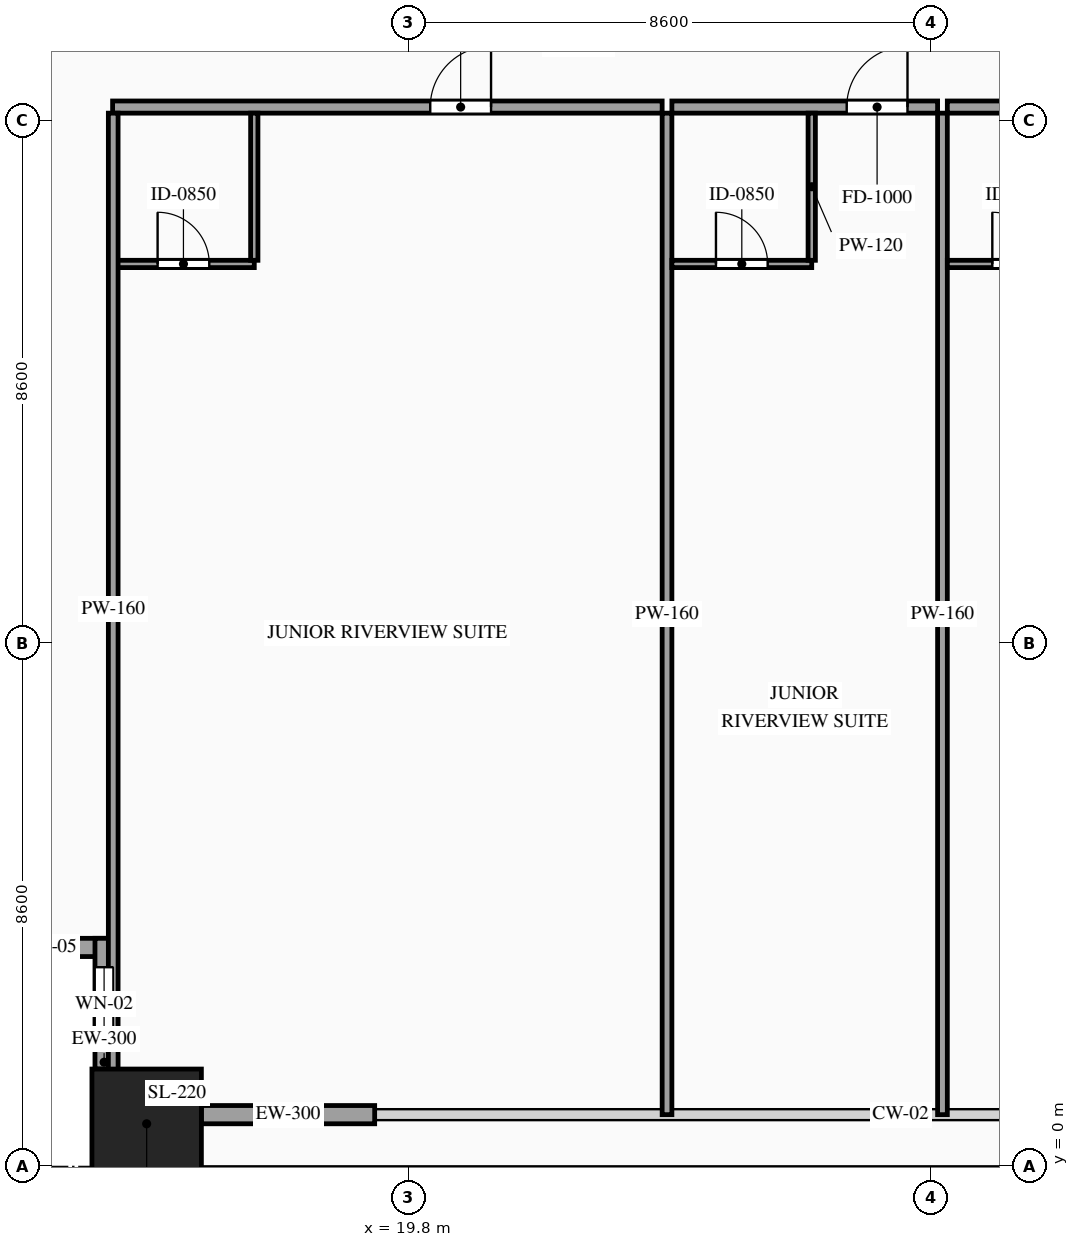
"""IFC4 building model, lengths in metres.
Left out: names, types, materials, properties, quantities, classifications, styles, units other than length and angle.
Written with IfcOpenShell. Run it as: python <this file> out.ifc"""

import sys

from ifc_helpers import new_model, si_unit, direction, frame, frame_2d, origin, origin_2d, place, context, subcontext, project, spatial, rectangle, hollow_rectangle, extrude, source, transform, mapped, element, fill, save


model = new_model("IFC4")
c1 = context("Model", 3, precision=1e-05, world=origin(), true_north=direction((0.0, 1.0)))
c2 = subcontext(c1, "Body", "Model", "MODEL_VIEW")
j1 = project(units=[si_unit("LENGTHUNIT", "METRE"), si_unit("PLANEANGLEUNIT", "RADIAN")], contexts=[c1])
p1 = place(None, origin())
s1 = spatial("IfcSite", under=j1, at=p1, CompositionType="ELEMENT")
p2 = place(p1, origin())
s2 = spatial("IfcBuilding", under=s1, at=p2, CompositionType="ELEMENT")
p3 = place(p2, frame((0.0, 0.0, 67.6)))
s3 = spatial("IfcBuildingStorey", under=s2, at=p3, CompositionType="ELEMENT", Elevation=67.6)
m1 = source(origin(), c2, "Body", "SweptSolid", [
    extrude(hollow_rectangle(XDim=1.8, YDim=1.8, WallThickness=0.08, at=origin_2d()), origin(), (0.0, 0.0, 1.0), 3.6),
])
p4 = place(p3, frame((15.5, 0.7, 0.0), z_axis=(0.0, 0.0, 1.0), x_axis=(1.0, 0.0, 0.0)))
e1 = element("IfcColumn", 1, at=p4, inside=s3, PredefinedType="COLUMN", context=c2, shape_type="MappedRepresentation", body=[
    mapped(m1, transform((0.0, 0.0, 0.0), scale=1.0)),
])
p5 = place(p3, frame((12.8, 3.6, 0.0), z_axis=(0.0, 0.0, 1.0), x_axis=(1.0, 0.0, 0.0)))
e2 = element("IfcWall", 2, at=p5, inside=s3, PredefinedType="SOLIDWALL", context=c2, shape_type="SweptSolid", body=[
    extrude(rectangle(XDim=2.15, YDim=0.3, at=frame_2d((1.075, 0.0))), origin(), (0.0, 0.0, 1.0), 3.38),
])
p6 = place(p5, frame((0.625, 0.0, 0.85)))
e3 = element("IfcOpeningElement", 3, at=p6, cuts=e2, PredefinedType="OPENING", context=c2, shape_type="SweptSolid", body=[
    extrude(rectangle(XDim=0.9, YDim=1.5, at=frame_2d((0.45, 0.75))), frame((0.0, 0.165, 0.0), z_axis=(0.0, -1.0, 0.0), x_axis=(1.0, 0.0, 0.0)), (0.0, 0.0, 1.0), 0.33),
])
p7 = place(p3, frame((14.8, 3.75, 0.0), z_axis=(0.0, 0.0, 1.0), x_axis=(0.0, -1.0, 0.0)))
e4 = element("IfcWall", 4, at=p7, inside=s3, PredefinedType="SOLIDWALL", context=c2, shape_type="SweptSolid", body=[
    extrude(rectangle(XDim=2.15, YDim=0.3, at=frame_2d((1.075, 0.0))), origin(), (0.0, 0.0, 1.0), 3.38),
])
p8 = place(p7, frame((0.475, 0.0, 0.85)))
e5 = element("IfcOpeningElement", 5, at=p8, cuts=e4, PredefinedType="OPENING", context=c2, shape_type="SweptSolid", body=[
    extrude(rectangle(XDim=1.2, YDim=2.1, at=frame_2d((0.6, 1.05))), frame((0.0, 0.165, 0.0), z_axis=(0.0, -1.0, 0.0), x_axis=(1.0, 0.0, 0.0)), (0.0, 0.0, 1.0), 0.33),
])
m2 = source(origin(), c2, "Body", "SweptSolid", [
    extrude(rectangle(XDim=2.85, YDim=0.3, at=frame_2d((1.425, 0.0))), origin(), (0.0, 0.0, 1.0), 2.775),
])
p9 = place(p3, frame((16.4, 0.85, 0.0), z_axis=(0.0, 0.0, 1.0), x_axis=(1.0, 0.0, 0.0)))
e6 = element("IfcWall", 6, at=p9, inside=s3, PredefinedType="SOLIDWALL", context=c2, shape_type="MappedRepresentation", body=[
    mapped(m2, transform((0.0, 0.0, 0.0), scale=1.0)),
])
p10 = place(p3, frame((14.94, 17.42, 0.0), z_axis=(0.0, 0.0, 1.0), x_axis=(1.0, 0.0, 0.0)))
e7 = element("IfcWall", 7, at=p10, inside=s3, PredefinedType="PARTITIONING", context=c2, shape_type="SweptSolid", body=[
    extrude(rectangle(XDim=9.038, YDim=0.2, at=frame_2d((4.519, 0.0))), origin(), (0.0, 0.0, 1.0), 3.38),
])
p11 = place(p10, frame((5.224, 0.0, 0.0)))
e8 = element("IfcOpeningElement", 8, at=p11, cuts=e7, PredefinedType="OPENING", context=c2, shape_type="SweptSolid", body=[
    extrude(rectangle(XDim=1.0, YDim=2.2, at=frame_2d((0.5, 1.1))), frame((0.0, 0.115, 0.0), z_axis=(0.0, -1.0, 0.0), x_axis=(1.0, 0.0, 0.0)), (0.0, 0.0, 1.0), 0.23),
])
m3 = source(origin(), c2, "Body", "SweptSolid", [
    extrude(rectangle(XDim=16.47, YDim=0.16, at=frame_2d((8.235, 0.0))), origin(), (0.0, 0.0, 1.0), 3.38),
])
p12 = place(p3, frame((24.058, 0.85, 0.0), z_axis=(0.0, 0.0, 1.0), x_axis=(0.0, 1.0, 0.0)))
e9 = element("IfcWall", 9, at=p12, inside=s3, PredefinedType="PARTITIONING", context=c2, shape_type="MappedRepresentation", body=[
    mapped(m3, transform((0.0, 0.0, 0.0), scale=1.0)),
])
p13 = place(p3, frame((14.94, 14.84, 0.0), z_axis=(0.0, 0.0, 1.0), x_axis=(1.0, 0.0, 0.0)))
e10 = element("IfcWall", 10, at=p13, inside=s3, PredefinedType="PARTITIONING", context=c2, shape_type="SweptSolid", body=[
    extrude(rectangle(XDim=2.33, YDim=0.12, at=frame_2d((1.165, 0.0))), origin(), (0.0, 0.0, 1.0), 3.38),
])
p14 = place(p13, frame((0.74, 0.0, 0.0)))
e11 = element("IfcOpeningElement", 11, at=p14, cuts=e10, PredefinedType="OPENING", context=c2, shape_type="SweptSolid", body=[
    extrude(rectangle(XDim=0.85, YDim=2.1, at=frame_2d((0.425, 1.05))), frame((0.0, 0.075, 0.0), z_axis=(0.0, -1.0, 0.0), x_axis=(1.0, 0.0, 0.0)), (0.0, 0.0, 1.0), 0.15),
])
m4 = source(origin(), c2, "Body", "SweptSolid", [
    extrude(rectangle(XDim=2.42, YDim=0.12, at=frame_2d((1.21, 0.0))), origin(), (0.0, 0.0, 1.0), 3.38),
])
p15 = place(p3, frame((17.27, 14.9, 0.0), z_axis=(0.0, 0.0, 1.0), x_axis=(0.0, 1.0, 0.0)))
e12 = element("IfcWall", 12, at=p15, inside=s3, PredefinedType="PARTITIONING", context=c2, shape_type="MappedRepresentation", body=[
    mapped(m4, transform((0.0, 0.0, 0.0), scale=1.0)),
])
p16 = place(p3, frame((24.138, 17.42, 0.0), z_axis=(0.0, 0.0, 1.0), x_axis=(1.0, 0.0, 0.0)))
e13 = element("IfcWall", 13, at=p16, inside=s3, PredefinedType="PARTITIONING", context=c2, shape_type="SweptSolid", body=[
    extrude(rectangle(XDim=4.37, YDim=0.2, at=frame_2d((2.185, 0.0))), origin(), (0.0, 0.0, 1.0), 3.38),
])
p17 = place(p16, frame((2.875, 0.0, 0.0)))
e14 = element("IfcOpeningElement", 14, at=p17, cuts=e13, PredefinedType="OPENING", context=c2, shape_type="SweptSolid", body=[
    extrude(rectangle(XDim=1.0, YDim=2.2, at=frame_2d((0.5, 1.1))), frame((0.0, 0.115, 0.0), z_axis=(0.0, -1.0, 0.0), x_axis=(1.0, 0.0, 0.0)), (0.0, 0.0, 1.0), 0.23),
])
p18 = place(p3, frame((28.588, 0.85, 0.0), z_axis=(0.0, 0.0, 1.0), x_axis=(0.0, 1.0, 0.0)))
e15 = element("IfcWall", 15, at=p18, inside=s3, PredefinedType="PARTITIONING", context=c2, shape_type="MappedRepresentation", body=[
    mapped(m3, transform((0.0, 0.0, 0.0), scale=1.0)),
])
p19 = place(p3, frame((24.138, 14.84, 0.0), z_axis=(0.0, 0.0, 1.0), x_axis=(1.0, 0.0, 0.0)))
e16 = element("IfcWall", 16, at=p19, inside=s3, PredefinedType="PARTITIONING", context=c2, shape_type="SweptSolid", body=[
    extrude(rectangle(XDim=2.3, YDim=0.12, at=frame_2d((1.15, 0.0))), origin(), (0.0, 0.0, 1.0), 3.38),
])
p20 = place(p19, frame((0.725, 0.0, 0.0)))
e17 = element("IfcOpeningElement", 17, at=p20, cuts=e16, PredefinedType="OPENING", context=c2, shape_type="SweptSolid", body=[
    extrude(rectangle(XDim=0.85, YDim=2.1, at=frame_2d((0.425, 1.05))), frame((0.0, 0.075, 0.0), z_axis=(0.0, -1.0, 0.0), x_axis=(1.0, 0.0, 0.0)), (0.0, 0.0, 1.0), 0.15),
])
p21 = place(p3, frame((26.438, 14.9, 0.0), z_axis=(0.0, 0.0, 1.0), x_axis=(0.0, 1.0, 0.0)))
e18 = element("IfcWall", 18, at=p21, inside=s3, PredefinedType="PARTITIONING", context=c2, shape_type="MappedRepresentation", body=[
    mapped(m4, transform((0.0, 0.0, 0.0), scale=1.0)),
])
p22 = place(p3, frame((28.668, 17.42, 0.0), z_axis=(0.0, 0.0, 1.0), x_axis=(1.0, 0.0, 0.0)))
e19 = element("IfcWall", 19, at=p22, inside=s3, PredefinedType="PARTITIONING", context=c2, shape_type="SweptSolid", body=[
    extrude(rectangle(XDim=10.017, YDim=0.2, at=frame_2d((5.009, 0.0))), origin(), (0.0, 0.0, 1.0), 3.38),
])
p23 = place(p22, frame((5.714, 0.0, 0.0)))
e20 = element("IfcOpeningElement", 20, at=p23, cuts=e19, PredefinedType="OPENING", context=c2, shape_type="SweptSolid", body=[
    extrude(rectangle(XDim=1.0, YDim=2.2, at=frame_2d((0.5, 1.1))), frame((0.0, 0.115, 0.0), z_axis=(0.0, -1.0, 0.0), x_axis=(1.0, 0.0, 0.0)), (0.0, 0.0, 1.0), 0.23),
])
p24 = place(p3, frame((28.668, 14.84, 0.0), z_axis=(0.0, 0.0, 1.0), x_axis=(1.0, 0.0, 0.0)))
e21 = element("IfcWall", 21, at=p24, inside=s3, PredefinedType="PARTITIONING", context=c2, shape_type="SweptSolid", body=[
    extrude(rectangle(XDim=2.33, YDim=0.12, at=frame_2d((1.165, 0.0))), origin(), (0.0, 0.0, 1.0), 3.38),
])
p25 = place(p24, frame((0.74, 0.0, 0.0)))
e22 = element("IfcOpeningElement", 22, at=p25, cuts=e21, PredefinedType="OPENING", context=c2, shape_type="SweptSolid", body=[
    extrude(rectangle(XDim=0.85, YDim=2.1, at=frame_2d((0.425, 1.05))), frame((0.0, 0.075, 0.0), z_axis=(0.0, -1.0, 0.0), x_axis=(1.0, 0.0, 0.0)), (0.0, 0.0, 1.0), 0.15),
])
m5 = source(origin(), c2, "Body", "SweptSolid", [
    extrude(rectangle(XDim=16.32, YDim=0.16, at=frame_2d((8.16, 0.0))), origin(), (0.0, 0.0, 1.0), 3.38),
])
p26 = place(p3, frame((14.95, 1.0, 0.0), z_axis=(0.0, 0.0, 1.0), x_axis=(0.0, 1.0, 0.0)))
e23 = element("IfcWall", 23, at=p26, inside=s3, PredefinedType="PARTITIONING", context=c2, shape_type="MappedRepresentation", body=[
    mapped(m5, transform((0.0, 0.0, 0.0), scale=1.0)),
])
m6 = source(origin(), c2, "Body", "SweptSolid", [
    extrude(rectangle(XDim=0.9, YDim=1.5, at=frame_2d((0.45, 0.75))), frame((0.0, 0.03, 0.0), z_axis=(0.0, -1.0, 0.0), x_axis=(1.0, 0.0, 0.0)), (0.0, 0.0, 1.0), 0.06),
])
p27 = place(p6, origin())
e24 = element("IfcWindow", 24, at=p27, inside=s3, PartitioningType="SINGLE_PANEL", PredefinedType="WINDOW", context=c2, shape_type="MappedRepresentation", body=[
    mapped(m6, transform((0.0, 0.0, 0.0), scale=1.0)),
])
fill(e3, e24)
m7 = source(origin(), c2, "Body", "SweptSolid", [
    extrude(rectangle(XDim=1.2, YDim=2.1, at=frame_2d((0.6, 1.05))), frame((0.0, 0.03, 0.0), z_axis=(0.0, -1.0, 0.0), x_axis=(1.0, 0.0, 0.0)), (0.0, 0.0, 1.0), 0.06),
])
p28 = place(p8, origin())
e25 = element("IfcWindow", 25, at=p28, inside=s3, PartitioningType="SINGLE_PANEL", PredefinedType="WINDOW", context=c2, shape_type="MappedRepresentation", body=[
    mapped(m7, transform((0.0, 0.0, 0.0), scale=1.0)),
])
fill(e5, e25)
m8 = source(origin(), c2, "Body", "SweptSolid", [
    extrude(rectangle(XDim=1.0, YDim=2.2, at=frame_2d((0.5, 1.1))), frame((0.0, 0.025, 0.0), z_axis=(0.0, -1.0, 0.0), x_axis=(1.0, 0.0, 0.0)), (0.0, 0.0, 1.0), 0.05),
])
p29 = place(p11, origin())
e26 = element("IfcDoor", 26, at=p29, inside=s3, OperationType="SINGLE_SWING_RIGHT", PredefinedType="DOOR", context=c2, shape_type="MappedRepresentation", body=[
    mapped(m8, transform((0.0, 0.0, 0.0), scale=1.0)),
])
fill(e8, e26)
m9 = source(origin(), c2, "Body", "SweptSolid", [
    extrude(rectangle(XDim=0.85, YDim=2.1, at=frame_2d((0.425, 1.05))), frame((0.0, 0.025, 0.0), z_axis=(0.0, -1.0, 0.0), x_axis=(1.0, 0.0, 0.0)), (0.0, 0.0, 1.0), 0.05),
])
p30 = place(p14, origin())
e27 = element("IfcDoor", 27, at=p30, inside=s3, OperationType="SINGLE_SWING_LEFT", PredefinedType="DOOR", context=c2, shape_type="MappedRepresentation", body=[
    mapped(m9, transform((0.0, 0.0, 0.0), scale=1.0)),
])
fill(e11, e27)
p31 = place(p17, origin())
e28 = element("IfcDoor", 28, at=p31, inside=s3, OperationType="SINGLE_SWING_RIGHT", PredefinedType="DOOR", context=c2, shape_type="MappedRepresentation", body=[
    mapped(m8, transform((0.0, 0.0, 0.0), scale=1.0)),
])
fill(e14, e28)
p32 = place(p20, origin())
e29 = element("IfcDoor", 29, at=p32, inside=s3, OperationType="SINGLE_SWING_LEFT", PredefinedType="DOOR", context=c2, shape_type="MappedRepresentation", body=[
    mapped(m9, transform((0.0, 0.0, 0.0), scale=1.0)),
])
fill(e17, e29)
p33 = place(p25, origin())
e30 = element("IfcDoor", 30, at=p33, inside=s3, OperationType="SINGLE_SWING_LEFT", PredefinedType="DOOR", context=c2, shape_type="MappedRepresentation", body=[
    mapped(m9, transform((0.0, 0.0, 0.0), scale=1.0)),
])
fill(e22, e30)
save(model, sys.argv[1])
